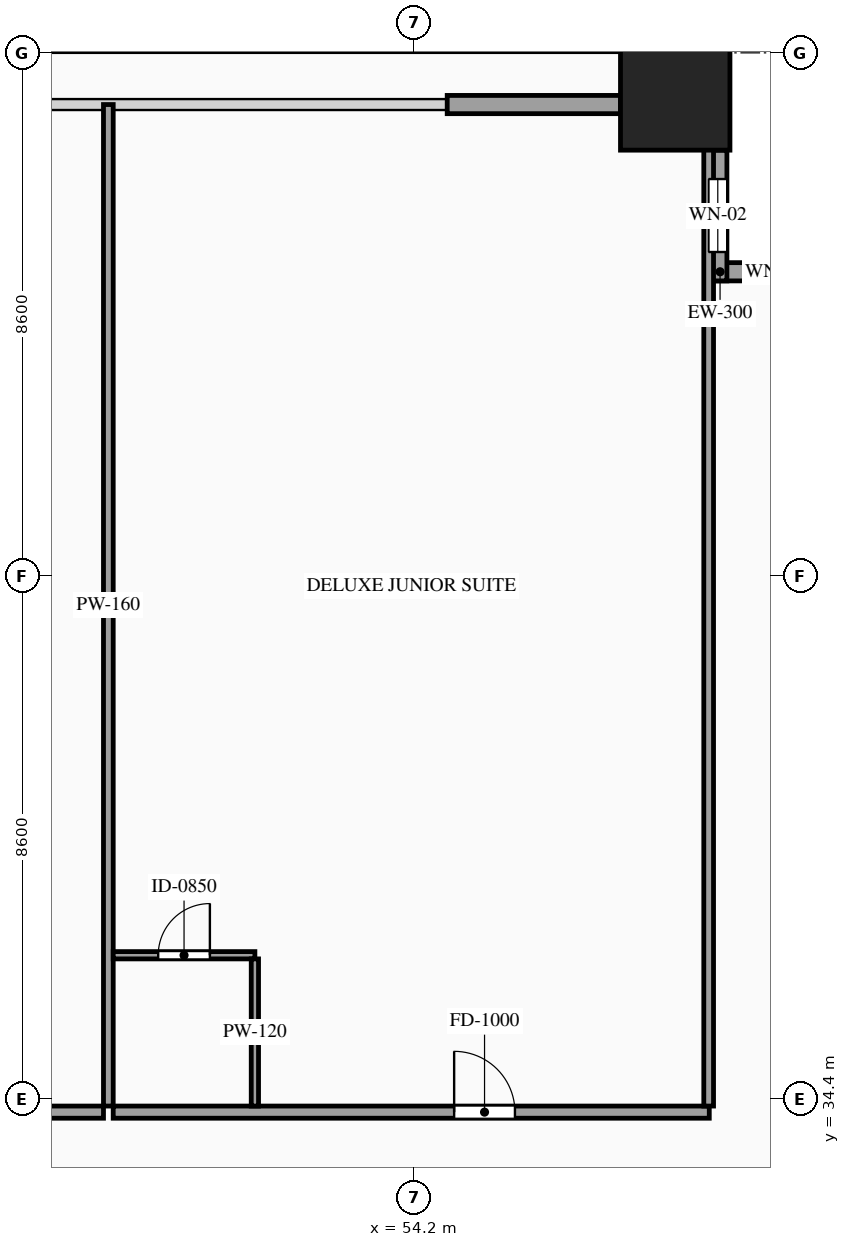
"""IFC4 building model, lengths in metres.
Left out: names, types, materials, properties, quantities, classifications, styles, units other than length and angle.
Written with IfcOpenShell. Run it as: python <this file> out.ifc"""

import sys

from ifc_helpers import new_model, si_unit, direction, frame, frame_2d, origin, origin_2d, place, context, subcontext, project, spatial, rectangle, hollow_rectangle, extrude, source, transform, mapped, element, fill, save


model = new_model("IFC4")
c1 = context("Model", 3, precision=1e-05, world=origin(), true_north=direction((0.0, 1.0)))
c2 = subcontext(c1, "Body", "Model", "MODEL_VIEW")
j1 = project(units=[si_unit("LENGTHUNIT", "METRE"), si_unit("PLANEANGLEUNIT", "RADIAN")], contexts=[c1])
p1 = place(None, origin())
s1 = spatial("IfcSite", under=j1, at=p1, CompositionType="ELEMENT")
p2 = place(p1, origin())
s2 = spatial("IfcBuilding", under=s1, at=p2, CompositionType="ELEMENT")
p3 = place(p2, frame((0.0, 0.0, 78.4)))
s3 = spatial("IfcBuildingStorey", under=s2, at=p3, CompositionType="ELEMENT", Elevation=78.4)
m1 = source(origin(), c2, "Body", "SweptSolid", [
    extrude(hollow_rectangle(XDim=1.8, YDim=1.8, WallThickness=0.08, at=origin_2d()), origin(), (0.0, 0.0, 1.0), 3.6),
])
p4 = place(p3, frame((58.5, 50.9, 0.0), z_axis=(0.0, 0.0, 1.0), x_axis=(1.0, 0.0, 0.0)))
e1 = element("IfcColumn", 1, at=p4, inside=s3, PredefinedType="COLUMN", context=c2, shape_type="MappedRepresentation", body=[
    mapped(m1, transform((0.0, 0.0, 0.0), scale=1.0)),
])
p5 = place(p3, frame((61.2, 48.0, 0.0), z_axis=(0.0, 0.0, 1.0), x_axis=(-1.0, 0.0, 0.0)))
e2 = element("IfcWall", 2, at=p5, inside=s3, PredefinedType="SOLIDWALL", context=c2, shape_type="SweptSolid", body=[
    extrude(rectangle(XDim=2.15, YDim=0.3, at=frame_2d((1.075, 0.0))), origin(), (0.0, 0.0, 1.0), 3.38),
])
p6 = place(p5, frame((0.625, 0.0, 0.85)))
e3 = element("IfcOpeningElement", 3, at=p6, cuts=e2, PredefinedType="OPENING", context=c2, shape_type="SweptSolid", body=[
    extrude(rectangle(XDim=0.9, YDim=1.5, at=frame_2d((0.45, 0.75))), frame((0.0, 0.165, 0.0), z_axis=(0.0, -1.0, 0.0), x_axis=(1.0, 0.0, 0.0)), (0.0, 0.0, 1.0), 0.33),
])
p7 = place(p3, frame((59.2, 47.85, 0.0), z_axis=(0.0, 0.0, 1.0), x_axis=(0.0, 1.0, 0.0)))
e4 = element("IfcWall", 4, at=p7, inside=s3, PredefinedType="SOLIDWALL", context=c2, shape_type="SweptSolid", body=[
    extrude(rectangle(XDim=2.15, YDim=0.3, at=frame_2d((1.075, 0.0))), origin(), (0.0, 0.0, 1.0), 3.38),
])
p8 = place(p7, frame((0.475, 0.0, 0.85)))
e5 = element("IfcOpeningElement", 5, at=p8, cuts=e4, PredefinedType="OPENING", context=c2, shape_type="SweptSolid", body=[
    extrude(rectangle(XDim=1.2, YDim=2.1, at=frame_2d((0.6, 1.05))), frame((0.0, 0.165, 0.0), z_axis=(0.0, -1.0, 0.0), x_axis=(1.0, 0.0, 0.0)), (0.0, 0.0, 1.0), 0.33),
])
m2 = source(origin(), c2, "Body", "SweptSolid", [
    extrude(rectangle(XDim=2.85, YDim=0.3, at=frame_2d((1.425, 0.0))), origin(), (0.0, 0.0, 1.0), 2.775),
])
p9 = place(p3, frame((54.75, 50.75, 0.0), z_axis=(0.0, 0.0, 1.0), x_axis=(1.0, 0.0, 0.0)))
e6 = element("IfcWall", 6, at=p9, inside=s3, PredefinedType="SOLIDWALL", context=c2, shape_type="MappedRepresentation", body=[
    mapped(m2, transform((0.0, 0.0, 0.0), scale=1.0)),
])
p10 = place(p3, frame((43.257, 34.18, 0.0), z_axis=(0.0, 0.0, 1.0), x_axis=(1.0, 0.0, 0.0)))
e7 = element("IfcWall", 7, at=p10, inside=s3, PredefinedType="PARTITIONING", context=c2, shape_type="SweptSolid", body=[
    extrude(rectangle(XDim=5.84, YDim=0.2, at=frame_2d((2.92, 0.0))), origin(), (0.0, 0.0, 1.0), 3.38),
])
p11 = place(p10, frame((3.625, 0.0, 0.0)))
e8 = element("IfcOpeningElement", 8, at=p11, cuts=e7, PredefinedType="OPENING", context=c2, shape_type="SweptSolid", body=[
    extrude(rectangle(XDim=1.0, YDim=2.2, at=frame_2d((0.5, 1.1))), frame((0.0, 0.115, 0.0), z_axis=(0.0, -1.0, 0.0), x_axis=(1.0, 0.0, 0.0)), (0.0, 0.0, 1.0), 0.23),
])
m3 = source(origin(), c2, "Body", "SweptSolid", [
    extrude(rectangle(XDim=16.47, YDim=0.16, at=frame_2d((8.235, 0.0))), origin(), (0.0, 0.0, 1.0), 3.38),
])
p12 = place(p3, frame((49.177, 34.28, 0.0), z_axis=(0.0, 0.0, 1.0), x_axis=(0.0, 1.0, 0.0)))
e9 = element("IfcWall", 9, at=p12, inside=s3, PredefinedType="PARTITIONING", context=c2, shape_type="MappedRepresentation", body=[
    mapped(m3, transform((0.0, 0.0, 0.0), scale=1.0)),
])
p13 = place(p3, frame((49.257, 34.18, 0.0), z_axis=(0.0, 0.0, 1.0), x_axis=(1.0, 0.0, 0.0)))
e10 = element("IfcWall", 10, at=p13, inside=s3, PredefinedType="PARTITIONING", context=c2, shape_type="SweptSolid", body=[
    extrude(rectangle(XDim=9.803, YDim=0.2, at=frame_2d((4.901, 0.0))), origin(), (0.0, 0.0, 1.0), 3.38),
])
p14 = place(p13, frame((5.607, 0.0, 0.0)))
e11 = element("IfcOpeningElement", 11, at=p14, cuts=e10, PredefinedType="OPENING", context=c2, shape_type="SweptSolid", body=[
    extrude(rectangle(XDim=1.0, YDim=2.2, at=frame_2d((0.5, 1.1))), frame((0.0, 0.115, 0.0), z_axis=(0.0, -1.0, 0.0), x_axis=(1.0, 0.0, 0.0)), (0.0, 0.0, 1.0), 0.23),
])
m4 = source(origin(), c2, "Body", "SweptSolid", [
    extrude(rectangle(XDim=16.32, YDim=0.16, at=frame_2d((8.16, 0.0))), origin(), (0.0, 0.0, 1.0), 3.38),
])
p15 = place(p3, frame((59.05, 34.28, 0.0), z_axis=(0.0, 0.0, 1.0), x_axis=(0.0, 1.0, 0.0)))
e12 = element("IfcWall", 12, at=p15, inside=s3, PredefinedType="PARTITIONING", context=c2, shape_type="MappedRepresentation", body=[
    mapped(m4, transform((0.0, 0.0, 0.0), scale=1.0)),
])
p16 = place(p3, frame((49.257, 36.76, 0.0), z_axis=(0.0, 0.0, 1.0), x_axis=(1.0, 0.0, 0.0)))
e13 = element("IfcWall", 13, at=p16, inside=s3, PredefinedType="PARTITIONING", context=c2, shape_type="SweptSolid", body=[
    extrude(rectangle(XDim=2.33, YDim=0.12, at=frame_2d((1.165, 0.0))), origin(), (0.0, 0.0, 1.0), 3.38),
])
p17 = place(p16, frame((0.74, 0.0, 0.0)))
e14 = element("IfcOpeningElement", 14, at=p17, cuts=e13, PredefinedType="OPENING", context=c2, shape_type="SweptSolid", body=[
    extrude(rectangle(XDim=0.85, YDim=2.1, at=frame_2d((0.425, 1.05))), frame((0.0, 0.075, 0.0), z_axis=(0.0, -1.0, 0.0), x_axis=(1.0, 0.0, 0.0)), (0.0, 0.0, 1.0), 0.15),
])
m5 = source(origin(), c2, "Body", "SweptSolid", [
    extrude(rectangle(XDim=2.42, YDim=0.12, at=frame_2d((1.21, 0.0))), origin(), (0.0, 0.0, 1.0), 3.38),
])
p18 = place(p3, frame((51.587, 34.28, 0.0), z_axis=(0.0, 0.0, 1.0), x_axis=(0.0, 1.0, 0.0)))
e15 = element("IfcWall", 15, at=p18, inside=s3, PredefinedType="PARTITIONING", context=c2, shape_type="MappedRepresentation", body=[
    mapped(m5, transform((0.0, 0.0, 0.0), scale=1.0)),
])
m6 = source(origin(), c2, "Body", "SweptSolid", [
    extrude(rectangle(XDim=0.9, YDim=1.5, at=frame_2d((0.45, 0.75))), frame((0.0, 0.03, 0.0), z_axis=(0.0, -1.0, 0.0), x_axis=(1.0, 0.0, 0.0)), (0.0, 0.0, 1.0), 0.06),
])
p19 = place(p6, origin())
e16 = element("IfcWindow", 16, at=p19, inside=s3, PartitioningType="SINGLE_PANEL", PredefinedType="WINDOW", context=c2, shape_type="MappedRepresentation", body=[
    mapped(m6, transform((0.0, 0.0, 0.0), scale=1.0)),
])
fill(e3, e16)
m7 = source(origin(), c2, "Body", "SweptSolid", [
    extrude(rectangle(XDim=1.2, YDim=2.1, at=frame_2d((0.6, 1.05))), frame((0.0, 0.03, 0.0), z_axis=(0.0, -1.0, 0.0), x_axis=(1.0, 0.0, 0.0)), (0.0, 0.0, 1.0), 0.06),
])
p20 = place(p8, origin())
e17 = element("IfcWindow", 17, at=p20, inside=s3, PartitioningType="SINGLE_PANEL", PredefinedType="WINDOW", context=c2, shape_type="MappedRepresentation", body=[
    mapped(m7, transform((0.0, 0.0, 0.0), scale=1.0)),
])
fill(e5, e17)
m8 = source(origin(), c2, "Body", "SweptSolid", [
    extrude(rectangle(XDim=1.0, YDim=2.2, at=frame_2d((0.5, 1.1))), frame((0.0, 0.025, 0.0), z_axis=(0.0, -1.0, 0.0), x_axis=(1.0, 0.0, 0.0)), (0.0, 0.0, 1.0), 0.05),
])
p21 = place(p14, origin())
e18 = element("IfcDoor", 18, at=p21, inside=s3, OperationType="SINGLE_SWING_LEFT", PredefinedType="DOOR", context=c2, shape_type="MappedRepresentation", body=[
    mapped(m8, transform((0.0, 0.0, 0.0), scale=1.0)),
])
fill(e11, e18)
m9 = source(origin(), c2, "Body", "SweptSolid", [
    extrude(rectangle(XDim=0.85, YDim=2.1, at=frame_2d((0.425, 1.05))), frame((0.0, 0.025, 0.0), z_axis=(0.0, -1.0, 0.0), x_axis=(1.0, 0.0, 0.0)), (0.0, 0.0, 1.0), 0.05),
])
p22 = place(p17, origin())
e19 = element("IfcDoor", 19, at=p22, inside=s3, OperationType="SINGLE_SWING_RIGHT", PredefinedType="DOOR", context=c2, shape_type="MappedRepresentation", body=[
    mapped(m9, transform((0.0, 0.0, 0.0), scale=1.0)),
])
fill(e14, e19)
save(model, sys.argv[1])
